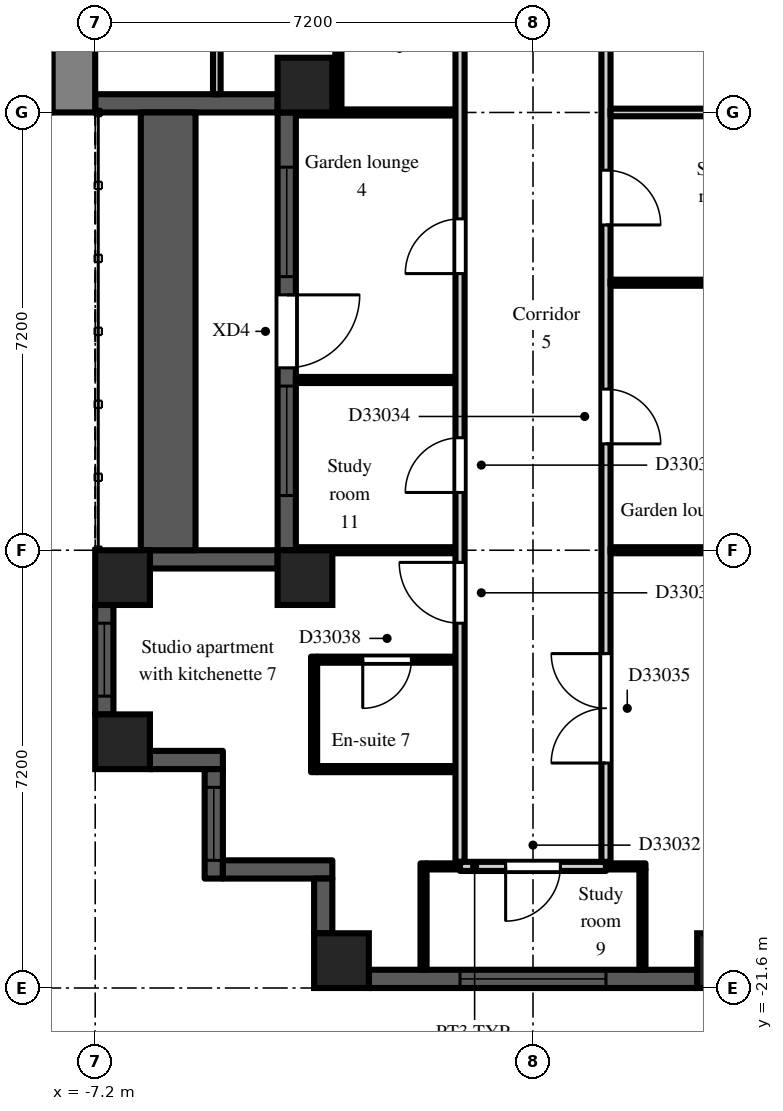
"""IFC4 building model, lengths in metres.
Left out: names, types, materials, properties, quantities, classifications, styles, units other than length and angle.
Written with IfcOpenShell. Run it as: python <this file> out.ifc"""

import sys

from ifc_helpers import new_model, si_unit, direction, frame, frame_2d, origin, origin_2d, place, context, subcontext, project, spatial, rectangle, extrude, element, fill, save


model = new_model("IFC4")
c1 = context("Model", 3, precision=1e-05, world=origin(), true_north=direction((0.0, 1.0)))
c2 = subcontext(c1, "Body", "Model", "MODEL_VIEW")
j1 = project(units=[si_unit("LENGTHUNIT", "METRE"), si_unit("PLANEANGLEUNIT", "RADIAN")], contexts=[c1])
p1 = place(None, origin())
s1 = spatial("IfcSite", under=j1, at=p1, CompositionType="ELEMENT")
p2 = place(p1, origin())
s2 = spatial("IfcBuilding", under=s1, at=p2, CompositionType="ELEMENT")
p3 = place(p2, frame((0.0, 0.0, 231.9)))
s3 = spatial("IfcBuildingStorey", under=s2, at=p3, CompositionType="ELEMENT", Elevation=231.9)
for number, where, z_axis, x_axis in (
    (1, (-6.75, -17.55, 0.0), (0.0, 0.0, 1.0), (1.0, 0.0, 0.0)),
    (2, (-6.75, -14.85, 0.0), (0.0, 0.0, 1.0), (1.0, 0.0, 0.0)),
    (3, (-3.75, -14.85, 0.0), (0.0, 0.0, 1.0), (1.0, 0.0, 0.0)),
    (4, (-3.75, -6.75, 0.0), (0.0, 0.0, 1.0), (1.0, 0.0, 0.0)),
    (5, (-3.15, -21.15, 0.0), (0.0, 0.0, 1.0), (1.0, 0.0, 0.0)),
    (6, (3.15, -21.15, 0.0), (0.0, 0.0, 1.0), (1.0, 0.0, 0.0)),
):
    element("IfcColumn", number, at=place(p3, frame(where, z_axis=z_axis, x_axis=x_axis)), inside=s3, PredefinedType="COLUMN", context=c2, shape_type="SweptSolid", body=[
        extrude(rectangle(XDim=0.9, YDim=0.9, at=origin_2d()), origin(), (0.0, 0.0, 1.0), 3.0),
    ])
p4 = place(p3, frame((-7.2, -7.05, 0.0), z_axis=(0.0, 0.0, 1.0), x_axis=(1.0, 0.0, 0.0)))
e7 = element("IfcWall", 7, at=p4, inside=s3, PredefinedType="SOLIDWALL", context=c2, shape_type="SweptSolid", body=[
    extrude(rectangle(XDim=3.0, YDim=0.3, at=frame_2d((1.5, 0.0))), origin(), (0.0, 0.0, 1.0), 2.3),
])
p5 = place(p3, frame((-4.05, -7.2, 0.0), z_axis=(0.0, 0.0, 1.0), x_axis=(0.0, -1.0, 0.0)))
e8 = element("IfcWall", 8, at=p5, inside=s3, PredefinedType="SOLIDWALL", context=c2, shape_type="SweptSolid", body=[
    extrude(rectangle(XDim=7.2, YDim=0.3, at=frame_2d((3.6, 0.0))), origin(), (0.0, 0.0, 1.0), 2.3),
])
p6 = place(p5, frame((3.0, 0.0, 0.0)))
e9 = element("IfcOpeningElement", 9, at=p6, cuts=e8, PredefinedType="OPENING", context=c2, shape_type="SweptSolid", body=[
    extrude(rectangle(XDim=1.2, YDim=2.05, at=frame_2d((0.6, 1.025))), frame((0.0, 0.16, 0.0), z_axis=(0.0, -1.0, 0.0), x_axis=(1.0, 0.0, 0.0)), (0.0, 0.0, 1.0), 0.32),
])
p7 = place(p5, frame((0.9, 0.0, 0.2)))
e10 = element("IfcOpeningElement", 10, at=p7, cuts=e8, PredefinedType="OPENING", context=c2, shape_type="SweptSolid", body=[
    extrude(rectangle(XDim=1.8, YDim=1.85, at=frame_2d((0.9, 0.925))), frame((0.0, 0.16, 0.0), z_axis=(0.0, -1.0, 0.0), x_axis=(1.0, 0.0, 0.0)), (0.0, 0.0, 1.0), 0.32),
])
p8 = place(p5, frame((4.5, 0.0, 0.2)))
e11 = element("IfcOpeningElement", 11, at=p8, cuts=e8, PredefinedType="OPENING", context=c2, shape_type="SweptSolid", body=[
    extrude(rectangle(XDim=1.8, YDim=1.85, at=frame_2d((0.9, 0.925))), frame((0.0, 0.16, 0.0), z_axis=(0.0, -1.0, 0.0), x_axis=(1.0, 0.0, 0.0)), (0.0, 0.0, 1.0), 0.32),
])
p9 = place(p3, frame((-4.2, -14.55, 0.0), z_axis=(0.0, 0.0, 1.0), x_axis=(-1.0, 0.0, 0.0)))
e12 = element("IfcWall", 12, at=p9, inside=s3, PredefinedType="SOLIDWALL", context=c2, shape_type="SweptSolid", body=[
    extrude(rectangle(XDim=2.1, YDim=0.3, at=frame_2d((1.05, 0.0))), origin(), (0.0, 0.0, 1.0), 2.3),
])
p10 = place(p3, frame((-7.05, -15.3, 0.0), z_axis=(0.0, 0.0, 1.0), x_axis=(0.0, -1.0, 0.0)))
e13 = element("IfcWall", 13, at=p10, inside=s3, PredefinedType="SOLIDWALL", context=c2, shape_type="SweptSolid", body=[
    extrude(rectangle(XDim=1.8, YDim=0.3, at=frame_2d((0.9, 0.0))), origin(), (0.0, 0.0, 1.0), 2.3),
])
p11 = place(p10, frame((0.3, 0.0, 0.2)))
e14 = element("IfcOpeningElement", 14, at=p11, cuts=e13, PredefinedType="OPENING", context=c2, shape_type="SweptSolid", body=[
    extrude(rectangle(XDim=1.2, YDim=1.85, at=frame_2d((0.6, 0.925))), frame((0.0, 0.16, 0.0), z_axis=(0.0, -1.0, 0.0), x_axis=(1.0, 0.0, 0.0)), (0.0, 0.0, 1.0), 0.32),
])
p12 = place(p3, frame((-6.3, -17.85, 0.0), z_axis=(0.0, 0.0, 1.0), x_axis=(1.0, 0.0, 0.0)))
e15 = element("IfcWall", 15, at=p12, inside=s3, PredefinedType="SOLIDWALL", context=c2, shape_type="SweptSolid", body=[
    extrude(rectangle(XDim=1.2, YDim=0.3, at=frame_2d((0.6, 0.0))), origin(), (0.0, 0.0, 1.0), 2.6),
])
p13 = place(p3, frame((-5.25, -18.0, 0.0), z_axis=(0.0, 0.0, 1.0), x_axis=(0.0, -1.0, 0.0)))
e16 = element("IfcWall", 16, at=p13, inside=s3, PredefinedType="SOLIDWALL", context=c2, shape_type="SweptSolid", body=[
    extrude(rectangle(XDim=1.8, YDim=0.3, at=frame_2d((0.9, 0.0))), origin(), (0.0, 0.0, 1.0), 2.6),
])
p14 = place(p13, frame((0.3, 0.0, 0.2)))
e17 = element("IfcOpeningElement", 17, at=p14, cuts=e16, PredefinedType="OPENING", context=c2, shape_type="SweptSolid", body=[
    extrude(rectangle(XDim=1.2, YDim=1.85, at=frame_2d((0.6, 0.925))), frame((0.0, 0.16, 0.0), z_axis=(0.0, -1.0, 0.0), x_axis=(1.0, 0.0, 0.0)), (0.0, 0.0, 1.0), 0.32),
])
p15 = place(p3, frame((-5.1, -19.65, 0.0), z_axis=(0.0, 0.0, 1.0), x_axis=(1.0, 0.0, 0.0)))
e18 = element("IfcWall", 18, at=p15, inside=s3, PredefinedType="SOLIDWALL", context=c2, shape_type="SweptSolid", body=[
    extrude(rectangle(XDim=1.8, YDim=0.3, at=frame_2d((0.9, 0.0))), origin(), (0.0, 0.0, 1.0), 2.6),
])
p16 = place(p3, frame((-3.45, -19.8, 0.0), z_axis=(0.0, 0.0, 1.0), x_axis=(0.0, -1.0, 0.0)))
e19 = element("IfcWall", 19, at=p16, inside=s3, PredefinedType="SOLIDWALL", context=c2, shape_type="SweptSolid", body=[
    extrude(rectangle(XDim=0.9, YDim=0.3, at=frame_2d((0.45, 0.0))), origin(), (0.0, 0.0, 1.0), 2.6),
])
p17 = place(p3, frame((-2.7, -21.45, 0.0), z_axis=(0.0, 0.0, 1.0), x_axis=(1.0, 0.0, 0.0)))
e20 = element("IfcWall", 20, at=p17, inside=s3, PredefinedType="SOLIDWALL", context=c2, shape_type="SweptSolid", body=[
    extrude(rectangle(XDim=5.4, YDim=0.3, at=frame_2d((2.7, 0.0))), origin(), (0.0, 0.0, 1.0), 2.3),
])
p18 = place(p17, frame((1.5, 0.0, 0.2)))
e21 = element("IfcOpeningElement", 21, at=p18, cuts=e20, PredefinedType="OPENING", context=c2, shape_type="SweptSolid", body=[
    extrude(rectangle(XDim=2.4, YDim=1.85, at=frame_2d((1.2, 0.925))), frame((0.0, 0.16, 0.0), z_axis=(0.0, -1.0, 0.0), x_axis=(1.0, 0.0, 0.0)), (0.0, 0.0, 1.0), 0.32),
])
p19 = place(p3, frame((-6.0, -14.4, 0.0), z_axis=(0.0, 0.0, 1.0), x_axis=(0.0, 1.0, 0.0)))
e22 = element("IfcWall", 22, at=p19, inside=s3, PredefinedType="PARAPET", context=c2, shape_type="SweptSolid", body=[
    extrude(rectangle(XDim=7.2, YDim=0.9, at=frame_2d((3.6, 0.0))), origin(), (0.0, 0.0, 1.0), 0.8),
])
p20 = place(p3, frame((-7.55, -7.2, 0.0), z_axis=(0.0, 0.0, 1.0), x_axis=(0.0, 1.0, 0.0)))
e23 = element("IfcWall", 23, at=p20, inside=s3, PredefinedType="SHEAR", context=c2, shape_type="SweptSolid", body=[
    extrude(rectangle(XDim=14.4, YDim=0.7, at=frame_2d((7.2, 0.0))), origin(), (0.0, 0.0, 1.0), 2.6),
])
p21 = place(p20, frame((6.0, 0.0, 0.0)))
e24 = element("IfcOpeningElement", 24, at=p21, cuts=e23, PredefinedType="OPENING", context=c2, shape_type="SweptSolid", body=[
    extrude(rectangle(XDim=2.4, YDim=2.2, at=frame_2d((1.2, 1.1))), frame((0.0, 0.36, 0.0), z_axis=(0.0, -1.0, 0.0), x_axis=(1.0, 0.0, 0.0)), (0.0, 0.0, 1.0), 0.72),
])
p22 = place(p3, frame((-5.2, -6.9, 0.0), z_axis=(0.0, 0.0, 1.0), x_axis=(0.0, 1.0, 0.0)))
e25 = element("IfcWall", 25, at=p22, inside=s3, PredefinedType="PARTITIONING", context=c2, shape_type="SweptSolid", body=[
    extrude(rectangle(XDim=5.625, YDim=0.125, at=frame_2d((2.812, 0.0))), origin(), (0.0, 0.0, 1.0), 2.6),
])
for number, where, z_axis, x_axis in (
    (26, (-3.9, -14.4, 0.0), (0.0, 0.0, 1.0), (1.0, 0.0, 0.0)),
    (27, (-3.9, -11.6, 0.0), (0.0, 0.0, 1.0), (1.0, 0.0, 0.0)),
    (28, (-3.9, -7.2, 0.0), (0.0, 0.0, 1.0), (1.0, 0.0, 0.0)),
):
    element("IfcWall", number, at=place(p3, frame(where, z_axis=z_axis, x_axis=x_axis)), inside=s3, PredefinedType="PARTITIONING", context=c2, shape_type="SweptSolid", body=[
        extrude(rectangle(XDim=2.625, YDim=0.1, at=frame_2d((1.312, 0.0))), origin(), (0.0, 0.0, 1.0), 2.6),
    ])
p23 = place(p3, frame((-3.6, -18.05, 0.0), z_axis=(0.0, 0.0, 1.0), x_axis=(0.0, 1.0, 0.0)))
e29 = element("IfcWall", 29, at=p23, inside=s3, PredefinedType="PARTITIONING", context=c2, shape_type="SweptSolid", body=[
    extrude(rectangle(XDim=1.9, YDim=0.1, at=frame_2d((0.95, 0.0))), origin(), (0.0, 0.0, 1.0), 2.6),
])
p24 = place(p3, frame((-3.55, -18.0, 0.0), z_axis=(0.0, 0.0, 1.0), x_axis=(1.0, 0.0, 0.0)))
e30 = element("IfcWall", 30, at=p24, inside=s3, PredefinedType="PARTITIONING", context=c2, shape_type="SweptSolid", body=[
    extrude(rectangle(XDim=2.275, YDim=0.1, at=frame_2d((1.138, 0.0))), origin(), (0.0, 0.0, 1.0), 2.6),
])
p25 = place(p3, frame((-3.55, -16.2, 0.0), z_axis=(0.0, 0.0, 1.0), x_axis=(1.0, 0.0, 0.0)))
e31 = element("IfcWall", 31, at=p25, inside=s3, PredefinedType="PARTITIONING", context=c2, shape_type="SweptSolid", body=[
    extrude(rectangle(XDim=2.275, YDim=0.1, at=frame_2d((1.138, 0.0))), origin(), (0.0, 0.0, 1.0), 2.6),
])
p26 = place(p25, frame((0.75, 0.0, 0.0)))
e32 = element("IfcOpeningElement", 32, at=p26, cuts=e31, PredefinedType="OPENING", context=c2, shape_type="SweptSolid", body=[
    extrude(rectangle(XDim=0.8, YDim=2.1, at=frame_2d((0.4, 1.05))), frame((0.0, 0.06, 0.0), z_axis=(0.0, -1.0, 0.0), x_axis=(1.0, 0.0, 0.0)), (0.0, 0.0, 1.0), 0.12),
])
p27 = place(p3, frame((-3.2, -7.15, 0.0), z_axis=(0.0, 0.0, 1.0), x_axis=(0.0, 1.0, 0.0)))
e33 = element("IfcWall", 33, at=p27, inside=s3, PredefinedType="PARTITIONING", context=c2, shape_type="SweptSolid", body=[
    extrude(rectangle(XDim=5.875, YDim=0.1, at=frame_2d((2.938, 0.0))), origin(), (0.0, 0.0, 1.0), 2.6),
])
p28 = place(p3, frame((-1.8, -21.3, 0.0), z_axis=(0.0, 0.0, 1.0), x_axis=(0.0, 1.0, 0.0)))
e34 = element("IfcWall", 34, at=p28, inside=s3, PredefinedType="PARTITIONING", context=c2, shape_type="SweptSolid", body=[
    extrude(rectangle(XDim=1.75, YDim=0.1, at=frame_2d((0.875, 0.0))), origin(), (0.0, 0.0, 1.0), 2.6),
])
p29 = place(p3, frame((-1.75, -19.6, 0.0), z_axis=(0.0, 0.0, 1.0), x_axis=(1.0, 0.0, 0.0)))
e35 = element("IfcWall", 35, at=p29, inside=s3, PredefinedType="PARTITIONING", context=c2, shape_type="SweptSolid", body=[
    extrude(rectangle(XDim=0.55, YDim=0.1, at=frame_2d((0.275, 0.0))), origin(), (0.0, 0.0, 1.0), 2.6),
])
p30 = place(p3, frame((-1.2, -19.525, 0.0), z_axis=(0.0, 0.0, 1.0), x_axis=(0.0, 1.0, 0.0)))
e36 = element("IfcWall", 36, at=p30, inside=s3, PredefinedType="PARTITIONING", context=c2, shape_type="SweptSolid", body=[
    extrude(rectangle(XDim=18.25, YDim=0.15, at=frame_2d((9.125, 0.0))), origin(), (0.0, 0.0, 1.0), 2.6),
])
p31 = place(p30, frame((14.875, 0.0, 0.0)))
e37 = element("IfcOpeningElement", 37, at=p31, cuts=e36, PredefinedType="OPENING", context=c2, shape_type="SweptSolid", body=[
    extrude(rectangle(XDim=0.9, YDim=2.1, at=frame_2d((0.45, 1.05))), frame((0.0, 0.085, 0.0), z_axis=(0.0, -1.0, 0.0), x_axis=(1.0, 0.0, 0.0)), (0.0, 0.0, 1.0), 0.17),
])
p32 = place(p30, frame((6.075, 0.0, 0.0)))
e38 = element("IfcOpeningElement", 38, at=p32, cuts=e36, PredefinedType="OPENING", context=c2, shape_type="SweptSolid", body=[
    extrude(rectangle(XDim=0.9, YDim=2.1, at=frame_2d((0.45, 1.05))), frame((0.0, 0.085, 0.0), z_axis=(0.0, -1.0, 0.0), x_axis=(1.0, 0.0, 0.0)), (0.0, 0.0, 1.0), 0.17),
])
p33 = place(p30, frame((9.675, 0.0, 0.0)))
e39 = element("IfcOpeningElement", 39, at=p33, cuts=e36, PredefinedType="OPENING", context=c2, shape_type="SweptSolid", body=[
    extrude(rectangle(XDim=0.9, YDim=2.1, at=frame_2d((0.45, 1.05))), frame((0.0, 0.085, 0.0), z_axis=(0.0, -1.0, 0.0), x_axis=(1.0, 0.0, 0.0)), (0.0, 0.0, 1.0), 0.17),
])
p34 = place(p30, frame((3.925, 0.0, 0.0)))
e40 = element("IfcOpeningElement", 40, at=p34, cuts=e36, PredefinedType="OPENING", context=c2, shape_type="SweptSolid", body=[
    extrude(rectangle(XDim=1.0, YDim=2.1, at=frame_2d((0.5, 1.05))), frame((0.0, 0.085, 0.0), z_axis=(0.0, -1.0, 0.0), x_axis=(1.0, 0.0, 0.0)), (0.0, 0.0, 1.0), 0.17),
])
p35 = place(p3, frame((-1.2, -19.6, 0.0), z_axis=(0.0, 0.0, 1.0), x_axis=(1.0, 0.0, 0.0)))
e41 = element("IfcWall", 41, at=p35, inside=s3, PredefinedType="PARTITIONING", context=c2, shape_type="SweptSolid", body=[
    extrude(rectangle(XDim=2.4, YDim=0.15, at=frame_2d((1.2, 0.0))), origin(), (0.0, 0.0, 1.0), 2.6),
])
p36 = place(p35, frame((0.75, 0.0, 0.0)))
e42 = element("IfcOpeningElement", 42, at=p36, cuts=e41, PredefinedType="OPENING", context=c2, shape_type="SweptSolid", body=[
    extrude(rectangle(XDim=0.9, YDim=2.1, at=frame_2d((0.45, 1.05))), frame((0.0, 0.085, 0.0), z_axis=(0.0, -1.0, 0.0), x_axis=(1.0, 0.0, 0.0)), (0.0, 0.0, 1.0), 0.17),
])
p37 = place(p3, frame((1.2, -19.525, 0.0), z_axis=(0.0, 0.0, 1.0), x_axis=(0.0, 1.0, 0.0)))
e43 = element("IfcWall", 43, at=p37, inside=s3, PredefinedType="PARTITIONING", context=c2, shape_type="SweptSolid", body=[
    extrude(rectangle(XDim=18.4, YDim=0.15, at=frame_2d((9.2, 0.0))), origin(), (0.0, 0.0, 1.0), 2.6),
])
p38 = place(p37, frame((14.875, 0.0, 0.0)))
e44 = element("IfcOpeningElement", 44, at=p38, cuts=e43, PredefinedType="OPENING", context=c2, shape_type="SweptSolid", body=[
    extrude(rectangle(XDim=0.9, YDim=2.1, at=frame_2d((0.45, 1.05))), frame((0.0, 0.085, 0.0), z_axis=(0.0, -1.0, 0.0), x_axis=(1.0, 0.0, 0.0)), (0.0, 0.0, 1.0), 0.17),
])
p39 = place(p37, frame((10.475, 0.0, 0.0)))
e45 = element("IfcOpeningElement", 45, at=p39, cuts=e43, PredefinedType="OPENING", context=c2, shape_type="SweptSolid", body=[
    extrude(rectangle(XDim=0.9, YDim=2.1, at=frame_2d((0.45, 1.05))), frame((0.0, 0.085, 0.0), z_axis=(0.0, -1.0, 0.0), x_axis=(1.0, 0.0, 0.0)), (0.0, 0.0, 1.0), 0.17),
])
p40 = place(p37, frame((6.875, 0.0, 0.0)))
e46 = element("IfcOpeningElement", 46, at=p40, cuts=e43, PredefinedType="OPENING", context=c2, shape_type="SweptSolid", body=[
    extrude(rectangle(XDim=0.9, YDim=2.1, at=frame_2d((0.45, 1.05))), frame((0.0, 0.085, 0.0), z_axis=(0.0, -1.0, 0.0), x_axis=(1.0, 0.0, 0.0)), (0.0, 0.0, 1.0), 0.17),
])
p41 = place(p37, frame((1.625, 0.0, 0.0)))
e47 = element("IfcOpeningElement", 47, at=p41, cuts=e43, PredefinedType="OPENING", context=c2, shape_type="SweptSolid", body=[
    extrude(rectangle(XDim=1.8, YDim=2.1, at=frame_2d((0.9, 1.05))), frame((0.0, 0.085, 0.0), z_axis=(0.0, -1.0, 0.0), x_axis=(1.0, 0.0, 0.0)), (0.0, 0.0, 1.0), 0.17),
])
p42 = place(p3, frame((1.2, -19.6, 0.0), z_axis=(0.0, 0.0, 1.0), x_axis=(1.0, 0.0, 0.0)))
e48 = element("IfcWall", 48, at=p42, inside=s3, PredefinedType="PARTITIONING", context=c2, shape_type="SweptSolid", body=[
    extrude(rectangle(XDim=0.65, YDim=0.1, at=frame_2d((0.325, 0.0))), origin(), (0.0, 0.0, 1.0), 2.6),
])
for number, where, z_axis, x_axis in (
    (49, (1.275, -14.4, 0.0), (0.0, 0.0, 1.0), (1.0, 0.0, 0.0)),
    (50, (1.275, -10.0, 0.0), (0.0, 0.0, 1.0), (1.0, 0.0, 0.0)),
):
    element("IfcWall", number, at=place(p3, frame(where, z_axis=z_axis, x_axis=x_axis)), inside=s3, PredefinedType="PARTITIONING", context=c2, shape_type="SweptSolid", body=[
        extrude(rectangle(XDim=2.625, YDim=0.1, at=frame_2d((1.312, 0.0))), origin(), (0.0, 0.0, 1.0), 2.6),
    ])
p43 = place(p3, frame((1.275, -7.2, 0.0), z_axis=(0.0, 0.0, 1.0), x_axis=(1.0, 0.0, 0.0)))
e51 = element("IfcWall", 51, at=p43, inside=s3, PredefinedType="PARTITIONING", context=c2, shape_type="SweptSolid", body=[
    extrude(rectangle(XDim=2.625, YDim=0.125, at=frame_2d((1.312, 0.0))), origin(), (0.0, 0.0, 1.0), 2.6),
])
p44 = place(p3, frame((1.8, -21.3, 0.0), z_axis=(0.0, 0.0, 1.0), x_axis=(0.0, 1.0, 0.0)))
e52 = element("IfcWall", 52, at=p44, inside=s3, PredefinedType="PARTITIONING", context=c2, shape_type="SweptSolid", body=[
    extrude(rectangle(XDim=1.65, YDim=0.1, at=frame_2d((0.825, 0.0))), origin(), (0.0, 0.0, 1.0), 2.6),
])
p45 = place(p6, origin())
e53 = element("IfcDoor", 53, at=p45, inside=s3, OperationType="SINGLE_SWING_LEFT", PredefinedType="DOOR", context=c2, shape_type="SweptSolid", body=[
    extrude(rectangle(XDim=1.2, YDim=2.05, at=frame_2d((0.6, 1.025))), frame((0.0, 0.025, 0.0), z_axis=(0.0, -1.0, 0.0), x_axis=(1.0, 0.0, 0.0)), (0.0, 0.0, 1.0), 0.05),
])
fill(e9, e53)
p46 = place(p7, origin())
e54 = element("IfcWindow", 54, at=p46, inside=s3, PartitioningType="SINGLE_PANEL", PredefinedType="WINDOW", context=c2, shape_type="SweptSolid", body=[
    extrude(rectangle(XDim=1.8, YDim=1.85, at=frame_2d((0.9, 0.925))), frame((0.0, 0.03, 0.0), z_axis=(0.0, -1.0, 0.0), x_axis=(1.0, 0.0, 0.0)), (0.0, 0.0, 1.0), 0.06),
])
fill(e10, e54)
p47 = place(p8, origin())
e55 = element("IfcWindow", 55, at=p47, inside=s3, PartitioningType="SINGLE_PANEL", PredefinedType="WINDOW", context=c2, shape_type="SweptSolid", body=[
    extrude(rectangle(XDim=1.8, YDim=1.85, at=frame_2d((0.9, 0.925))), frame((0.0, 0.03, 0.0), z_axis=(0.0, -1.0, 0.0), x_axis=(1.0, 0.0, 0.0)), (0.0, 0.0, 1.0), 0.06),
])
fill(e11, e55)
p48 = place(p11, origin())
e56 = element("IfcWindow", 56, at=p48, inside=s3, PartitioningType="SINGLE_PANEL", PredefinedType="WINDOW", context=c2, shape_type="SweptSolid", body=[
    extrude(rectangle(XDim=1.2, YDim=1.85, at=frame_2d((0.6, 0.925))), frame((0.0, 0.03, 0.0), z_axis=(0.0, -1.0, 0.0), x_axis=(1.0, 0.0, 0.0)), (0.0, 0.0, 1.0), 0.06),
])
fill(e14, e56)
p49 = place(p14, origin())
e57 = element("IfcWindow", 57, at=p49, inside=s3, PartitioningType="SINGLE_PANEL", PredefinedType="WINDOW", context=c2, shape_type="SweptSolid", body=[
    extrude(rectangle(XDim=1.2, YDim=1.85, at=frame_2d((0.6, 0.925))), frame((0.0, 0.03, 0.0), z_axis=(0.0, -1.0, 0.0), x_axis=(1.0, 0.0, 0.0)), (0.0, 0.0, 1.0), 0.06),
])
fill(e17, e57)
p50 = place(p18, origin())
e58 = element("IfcWindow", 58, at=p50, inside=s3, PartitioningType="SINGLE_PANEL", PredefinedType="WINDOW", context=c2, shape_type="SweptSolid", body=[
    extrude(rectangle(XDim=2.4, YDim=1.85, at=frame_2d((1.2, 0.925))), frame((0.0, 0.03, 0.0), z_axis=(0.0, -1.0, 0.0), x_axis=(1.0, 0.0, 0.0)), (0.0, 0.0, 1.0), 0.06),
])
fill(e21, e58)
p51 = place(p36, frame((0.9, 0.0, 0.0), z_axis=(0.0, 0.0, 1.0), x_axis=(-1.0, 0.0, 0.0)))
e59 = element("IfcDoor", 59, at=p51, inside=s3, OperationType="SINGLE_SWING_RIGHT", PredefinedType="DOOR", context=c2, shape_type="SweptSolid", body=[
    extrude(rectangle(XDim=0.9, YDim=2.1, at=frame_2d((0.45, 1.05))), frame((0.0, 0.025, 0.0), z_axis=(0.0, -1.0, 0.0), x_axis=(1.0, 0.0, 0.0)), (0.0, 0.0, 1.0), 0.05),
])
fill(e42, e59)
p52 = place(p39, frame((0.9, 0.0, 0.0), z_axis=(0.0, 0.0, 1.0), x_axis=(-1.0, 0.0, 0.0)))
e60 = element("IfcDoor", 60, at=p52, inside=s3, OperationType="SINGLE_SWING_RIGHT", PredefinedType="DOOR", context=c2, shape_type="SweptSolid", body=[
    extrude(rectangle(XDim=0.9, YDim=2.1, at=frame_2d((0.45, 1.05))), frame((0.0, 0.025, 0.0), z_axis=(0.0, -1.0, 0.0), x_axis=(1.0, 0.0, 0.0)), (0.0, 0.0, 1.0), 0.05),
])
fill(e45, e60)
p53 = place(p40, frame((0.9, 0.0, 0.0), z_axis=(0.0, 0.0, 1.0), x_axis=(-1.0, 0.0, 0.0)))
e61 = element("IfcDoor", 61, at=p53, inside=s3, OperationType="SINGLE_SWING_RIGHT", PredefinedType="DOOR", context=c2, shape_type="SweptSolid", body=[
    extrude(rectangle(XDim=0.9, YDim=2.1, at=frame_2d((0.45, 1.05))), frame((0.0, 0.025, 0.0), z_axis=(0.0, -1.0, 0.0), x_axis=(1.0, 0.0, 0.0)), (0.0, 0.0, 1.0), 0.05),
])
fill(e46, e61)
p54 = place(p41, origin())
e62 = element("IfcDoor", 62, at=p54, inside=s3, OperationType="DOUBLE_DOOR_DOUBLE_SWING", PredefinedType="DOOR", context=c2, shape_type="SweptSolid", body=[
    extrude(rectangle(XDim=1.8, YDim=2.1, at=frame_2d((0.9, 1.05))), frame((0.0, 0.025, 0.0), z_axis=(0.0, -1.0, 0.0), x_axis=(1.0, 0.0, 0.0)), (0.0, 0.0, 1.0), 0.05),
])
fill(e47, e62)
p55 = place(p32, origin())
e63 = element("IfcDoor", 63, at=p55, inside=s3, OperationType="SINGLE_SWING_LEFT", PredefinedType="DOOR", context=c2, shape_type="SweptSolid", body=[
    extrude(rectangle(XDim=0.9, YDim=2.1, at=frame_2d((0.45, 1.05))), frame((0.0, 0.025, 0.0), z_axis=(0.0, -1.0, 0.0), x_axis=(1.0, 0.0, 0.0)), (0.0, 0.0, 1.0), 0.05),
])
fill(e38, e63)
p56 = place(p33, origin())
e64 = element("IfcDoor", 64, at=p56, inside=s3, OperationType="SINGLE_SWING_LEFT", PredefinedType="DOOR", context=c2, shape_type="SweptSolid", body=[
    extrude(rectangle(XDim=0.9, YDim=2.1, at=frame_2d((0.45, 1.05))), frame((0.0, 0.025, 0.0), z_axis=(0.0, -1.0, 0.0), x_axis=(1.0, 0.0, 0.0)), (0.0, 0.0, 1.0), 0.05),
])
fill(e39, e64)
p57 = place(p26, frame((0.8, 0.0, 0.0), z_axis=(0.0, 0.0, 1.0), x_axis=(-1.0, 0.0, 0.0)))
e65 = element("IfcDoor", 65, at=p57, inside=s3, OperationType="SINGLE_SWING_RIGHT", PredefinedType="DOOR", context=c2, shape_type="SweptSolid", body=[
    extrude(rectangle(XDim=0.8, YDim=2.1, at=frame_2d((0.4, 1.05))), frame((0.0, 0.025, 0.0), z_axis=(0.0, -1.0, 0.0), x_axis=(1.0, 0.0, 0.0)), (0.0, 0.0, 1.0), 0.05),
])
fill(e32, e65)
p58 = place(p34, origin())
e66 = element("IfcDoor", 66, at=p58, inside=s3, OperationType="SINGLE_SWING_RIGHT", PredefinedType="DOOR", context=c2, shape_type="SweptSolid", body=[
    extrude(rectangle(XDim=1.0, YDim=2.1, at=frame_2d((0.5, 1.05))), frame((0.0, 0.025, 0.0), z_axis=(0.0, -1.0, 0.0), x_axis=(1.0, 0.0, 0.0)), (0.0, 0.0, 1.0), 0.05),
])
fill(e40, e66)
save(model, sys.argv[1])
